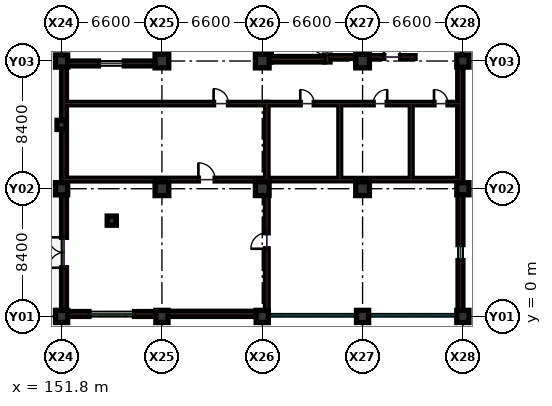
"""IFC4 building model, lengths in metres.
Left out: names, types, materials, properties, quantities, classifications, styles, units other than length and angle.
Written with IfcOpenShell. Run it as: python <this file> out.ifc"""

import sys

from ifc_helpers import new_model, si_unit, direction, frame, frame_2d, origin, origin_2d, place, context, subcontext, project, spatial, rectangle, extrude, element, fill, save


model = new_model("IFC4")
c1 = context("Model", 3, precision=1e-05, world=origin(), true_north=direction((0.0, 1.0)))
c2 = subcontext(c1, "Body", "Model", "MODEL_VIEW")
j1 = project(units=[si_unit("LENGTHUNIT", "METRE"), si_unit("PLANEANGLEUNIT", "RADIAN")], contexts=[c1])
p1 = place(None, origin())
s1 = spatial("IfcSite", under=j1, at=p1, CompositionType="ELEMENT")
p2 = place(p1, origin())
s2 = spatial("IfcBuilding", under=s1, at=p2, CompositionType="ELEMENT")
p3 = place(p2, origin())
s3 = spatial("IfcBuildingStorey", under=s2, at=p3, CompositionType="ELEMENT", Elevation=0.0)
for number, where, z_axis, x_axis in (
    (1, (151.8, 0.0, 0.0), (0.0, 0.0, 1.0), (1.0, 0.0, 0.0)),
    (2, (151.8, 8.4, 0.0), (0.0, 0.0, 1.0), (1.0, 0.0, 0.0)),
    (3, (151.8, 16.8, 0.0), (0.0, 0.0, 1.0), (1.0, 0.0, 0.0)),
    (4, (158.4, 0.0, 0.0), (0.0, 0.0, 1.0), (1.0, 0.0, 0.0)),
):
    element("IfcColumn", number, at=place(p3, frame(where, z_axis=z_axis, x_axis=x_axis)), inside=s3, PredefinedType="COLUMN", context=c2, shape_type="SweptSolid", body=[
        extrude(rectangle(XDim=0.8, YDim=0.8, at=origin_2d()), origin(), (0.0, 0.0, 1.0), 5.4),
    ])
for number, where, z_axis, x_axis in (
    (5, (158.4, 8.4, 0.0), (0.0, 0.0, 1.0), (1.0, 0.0, 0.0)),
    (6, (158.4, 16.8, 0.0), (0.0, 0.0, 1.0), (1.0, 0.0, 0.0)),
):
    element("IfcColumn", number, at=place(p3, frame(where, z_axis=z_axis, x_axis=x_axis)), inside=s3, PredefinedType="COLUMN", context=c2, shape_type="SweptSolid", body=[
        extrude(rectangle(XDim=0.9, YDim=0.9, at=origin_2d()), origin(), (0.0, 0.0, 1.0), 5.4),
    ])
p4 = place(p3, frame((165.0, 0.0, 0.0), z_axis=(0.0, 0.0, 1.0), x_axis=(1.0, 0.0, 0.0)))
e7 = element("IfcColumn", 7, at=p4, inside=s3, PredefinedType="COLUMN", context=c2, shape_type="SweptSolid", body=[
    extrude(rectangle(XDim=0.8, YDim=0.8, at=origin_2d()), origin(), (0.0, 0.0, 1.0), 5.4),
])
for number, where, z_axis, x_axis in (
    (8, (165.0, 8.4, 0.0), (0.0, 0.0, 1.0), (1.0, 0.0, 0.0)),
    (9, (165.0, 16.8, 0.0), (0.0, 0.0, 1.0), (1.0, 0.0, 0.0)),
):
    element("IfcColumn", number, at=place(p3, frame(where, z_axis=z_axis, x_axis=x_axis)), inside=s3, PredefinedType="COLUMN", context=c2, shape_type="SweptSolid", body=[
        extrude(rectangle(XDim=0.9, YDim=0.9, at=origin_2d()), origin(), (0.0, 0.0, 1.0), 5.4),
    ])
p5 = place(p3, frame((171.6, 0.0, 0.0), z_axis=(0.0, 0.0, 1.0), x_axis=(1.0, 0.0, 0.0)))
e10 = element("IfcColumn", 10, at=p5, inside=s3, PredefinedType="COLUMN", context=c2, shape_type="SweptSolid", body=[
    extrude(rectangle(XDim=0.8, YDim=0.8, at=origin_2d()), origin(), (0.0, 0.0, 1.0), 5.4),
])
for number, where, z_axis, x_axis in (
    (11, (171.6, 8.4, 0.0), (0.0, 0.0, 1.0), (1.0, 0.0, 0.0)),
    (12, (171.6, 16.8, 0.0), (0.0, 0.0, 1.0), (1.0, 0.0, 0.0)),
):
    element("IfcColumn", number, at=place(p3, frame(where, z_axis=z_axis, x_axis=x_axis)), inside=s3, PredefinedType="COLUMN", context=c2, shape_type="SweptSolid", body=[
        extrude(rectangle(XDim=0.9, YDim=0.9, at=origin_2d()), origin(), (0.0, 0.0, 1.0), 5.4),
    ])
for number, where, z_axis, x_axis in (
    (13, (178.2, 0.0, 0.0), (0.0, 0.0, 1.0), (1.0, 0.0, 0.0)),
    (14, (178.2, 8.4, 0.0), (0.0, 0.0, 1.0), (1.0, 0.0, 0.0)),
    (15, (178.2, 16.8, 0.0), (0.0, 0.0, 1.0), (1.0, 0.0, 0.0)),
):
    element("IfcColumn", number, at=place(p3, frame(where, z_axis=z_axis, x_axis=x_axis)), inside=s3, PredefinedType="COLUMN", context=c2, shape_type="SweptSolid", body=[
        extrude(rectangle(XDim=0.8, YDim=0.8, at=origin_2d()), origin(), (0.0, 0.0, 1.0), 5.4),
    ])
for number, where, z_axis, x_axis in (
    (16, (151.8, 12.6, 0.0), (0.0, 0.0, 1.0), (1.0, 0.0, 0.0)),
    (17, (155.1, 6.3, 0.0), (0.0, 0.0, 1.0), (1.0, 0.0, 0.0)),
):
    element("IfcColumn", number, at=place(p3, frame(where, z_axis=z_axis, x_axis=x_axis)), inside=s3, PredefinedType="COLUMN", context=c2, shape_type="SweptSolid", body=[
        extrude(rectangle(XDim=0.6, YDim=0.6, at=origin_2d()), origin(), (0.0, 0.0, 1.0), 5.4),
    ])
p6 = place(p3, frame((165.3, 14.0, 0.0), z_axis=(0.0, 0.0, 1.0), x_axis=(1.0, 0.0, 0.0)))
e18 = element("IfcWall", 18, at=p6, inside=s3, PredefinedType="PARTITIONING", context=c2, shape_type="SweptSolid", body=[
    extrude(rectangle(XDim=12.7, YDim=0.16, at=frame_2d((6.35, 0.0))), origin(), (0.0, 0.0, 1.0), 4.25),
])
p7 = place(p6, frame((2.2, 0.0, 0.0)))
e19 = element("IfcOpeningElement", 19, at=p7, cuts=e18, PredefinedType="OPENING", context=c2, shape_type="SweptSolid", body=[
    extrude(rectangle(XDim=0.92, YDim=2.08, at=frame_2d((0.46, 1.04))), frame((0.0, 0.09, 0.0), z_axis=(0.0, -1.0, 0.0), x_axis=(1.0, 0.0, 0.0)), (0.0, 0.0, 1.0), 0.18),
])
p8 = place(p6, frame((7.0, 0.0, 0.0)))
e20 = element("IfcOpeningElement", 20, at=p8, cuts=e18, PredefinedType="OPENING", context=c2, shape_type="SweptSolid", body=[
    extrude(rectangle(XDim=0.92, YDim=2.08, at=frame_2d((0.46, 1.04))), frame((0.0, 0.09, 0.0), z_axis=(0.0, -1.0, 0.0), x_axis=(1.0, 0.0, 0.0)), (0.0, 0.0, 1.0), 0.18),
])
p9 = place(p6, frame((11.0, 0.0, 0.0)))
e21 = element("IfcOpeningElement", 21, at=p9, cuts=e18, PredefinedType="OPENING", context=c2, shape_type="SweptSolid", body=[
    extrude(rectangle(XDim=0.92, YDim=2.08, at=frame_2d((0.46, 1.04))), frame((0.0, 0.09, 0.0), z_axis=(0.0, -1.0, 0.0), x_axis=(1.0, 0.0, 0.0)), (0.0, 0.0, 1.0), 0.18),
])
p10 = place(p3, frame((165.3, 9.0, 0.0), z_axis=(0.0, 0.0, 1.0), x_axis=(1.0, 0.0, 0.0)))
e22 = element("IfcWall", 22, at=p10, inside=s3, PredefinedType="PARTITIONING", context=c2, shape_type="SweptSolid", body=[
    extrude(rectangle(XDim=12.7, YDim=0.16, at=frame_2d((6.35, 0.0))), origin(), (0.0, 0.0, 1.0), 4.25),
])
p11 = place(p3, frame((165.3, 9.0, 0.0), z_axis=(0.0, 0.0, 1.0), x_axis=(0.0, 1.0, 0.0)))
e23 = element("IfcWall", 23, at=p11, inside=s3, PredefinedType="PARTITIONING", context=c2, shape_type="SweptSolid", body=[
    extrude(rectangle(XDim=5.0, YDim=0.16, at=frame_2d((2.5, 0.0))), origin(), (0.0, 0.0, 1.0), 4.25),
])
for number, where, z_axis, x_axis in (
    (24, (170.1, 9.0, 0.0), (0.0, 0.0, 1.0), (0.0, 1.0, 0.0)),
    (25, (174.8, 9.0, 0.0), (0.0, 0.0, 1.0), (0.0, 1.0, 0.0)),
):
    element("IfcWall", number, at=place(p3, frame(where, z_axis=z_axis, x_axis=x_axis)), inside=s3, PredefinedType="PARTITIONING", context=c2, shape_type="SweptSolid", body=[
        extrude(rectangle(XDim=5.0, YDim=0.12, at=frame_2d((2.5, 0.0))), origin(), (0.0, 0.0, 1.0), 4.25),
    ])
p12 = place(p3, frame((152.0, 9.0, 0.0), z_axis=(0.0, 0.0, 1.0), x_axis=(1.0, 0.0, 0.0)))
e26 = element("IfcWall", 26, at=p12, inside=s3, PredefinedType="SOLIDWALL", context=c2, shape_type="SweptSolid", body=[
    extrude(rectangle(XDim=13.3, YDim=0.18, at=frame_2d((6.65, 0.0))), origin(), (0.0, 0.0, 1.0), 4.25),
])
p13 = place(p12, frame((8.8, 0.0, 0.0)))
e27 = element("IfcOpeningElement", 27, at=p13, cuts=e26, PredefinedType="OPENING", context=c2, shape_type="SweptSolid", body=[
    extrude(rectangle(XDim=1.1, YDim=2.15, at=frame_2d((0.55, 1.075))), frame((0.0, 0.1, 0.0), z_axis=(0.0, -1.0, 0.0), x_axis=(1.0, 0.0, 0.0)), (0.0, 0.0, 1.0), 0.2),
])
p14 = place(p3, frame((165.3, 0.25, 0.0), z_axis=(0.0, 0.0, 1.0), x_axis=(0.0, 1.0, 0.0)))
e28 = element("IfcWall", 28, at=p14, inside=s3, PredefinedType="SOLIDWALL", context=c2, shape_type="SweptSolid", body=[
    extrude(rectangle(XDim=7.7, YDim=0.18, at=frame_2d((3.85, 0.0))), origin(), (0.0, 0.0, 1.0), 4.25),
])
p15 = place(p14, frame((4.2, 0.0, 0.0)))
e29 = element("IfcOpeningElement", 29, at=p15, cuts=e28, PredefinedType="OPENING", context=c2, shape_type="SweptSolid", body=[
    extrude(rectangle(XDim=1.05, YDim=2.15, at=frame_2d((0.525, 1.075))), frame((0.0, 0.1, 0.0), z_axis=(0.0, -1.0, 0.0), x_axis=(1.0, 0.0, 0.0)), (0.0, 0.0, 1.0), 0.2),
])
p16 = place(p3, frame((152.0, 14.0, 0.0), z_axis=(0.0, 0.0, 1.0), x_axis=(1.0, 0.0, 0.0)))
e30 = element("IfcWall", 30, at=p16, inside=s3, PredefinedType="PARTITIONING", context=c2, shape_type="SweptSolid", body=[
    extrude(rectangle(XDim=13.3, YDim=0.16, at=frame_2d((6.65, 0.0))), origin(), (0.0, 0.0, 1.0), 4.25),
])
p17 = place(p16, frame((9.8, 0.0, 0.0)))
e31 = element("IfcOpeningElement", 31, at=p17, cuts=e30, PredefinedType="OPENING", context=c2, shape_type="SweptSolid", body=[
    extrude(rectangle(XDim=0.98, YDim=2.12, at=frame_2d((0.49, 1.06))), frame((0.0, 0.09, 0.0), z_axis=(0.0, -1.0, 0.0), x_axis=(1.0, 0.0, 0.0)), (0.0, 0.0, 1.0), 0.18),
])
p18 = place(p3, frame((152.195, 0.16, 0.0), z_axis=(0.0, 0.0, 1.0), x_axis=(1.0, 0.0, 0.0)))
e32 = element("IfcWall", 32, at=p18, inside=s3, PredefinedType="SOLIDWALL", context=c2, shape_type="SweptSolid", body=[
    extrude(rectangle(XDim=5.81, YDim=0.32, at=frame_2d((2.905, 0.0))), origin(), (0.0, 0.0, 1.0), 4.385),
])
p19 = place(p18, frame((1.405, 0.0, 0.95)))
e33 = element("IfcOpeningElement", 33, at=p19, cuts=e32, PredefinedType="OPENING", context=c2, shape_type="SweptSolid", body=[
    extrude(rectangle(XDim=3.0, YDim=1.8, at=frame_2d((1.5, 0.9))), frame((0.0, 0.17, 0.0), z_axis=(0.0, -1.0, 0.0), x_axis=(1.0, 0.0, 0.0)), (0.0, 0.0, 1.0), 0.34),
])
p20 = place(p3, frame((151.96, 8.005, 0.0), z_axis=(0.0, 0.0, 1.0), x_axis=(0.0, -1.0, 0.0)))
e34 = element("IfcWall", 34, at=p20, inside=s3, PredefinedType="SOLIDWALL", context=c2, shape_type="SweptSolid", body=[
    extrude(rectangle(XDim=7.61, YDim=0.32, at=frame_2d((3.805, 0.0))), origin(), (0.0, 0.0, 1.0), 4.335),
])
p21 = place(p20, frame((2.805, 0.0, 0.0)))
e35 = element("IfcOpeningElement", 35, at=p21, cuts=e34, PredefinedType="OPENING", context=c2, shape_type="SweptSolid", body=[
    extrude(rectangle(XDim=2.0, YDim=2.4, at=frame_2d((1.0, 1.2))), frame((0.0, 0.17, 0.0), z_axis=(0.0, -1.0, 0.0), x_axis=(1.0, 0.0, 0.0)), (0.0, 0.0, 1.0), 0.34),
])
p22 = place(p3, frame((157.955, 16.64, 0.0), z_axis=(0.0, 0.0, 1.0), x_axis=(-1.0, 0.0, 0.0)))
e36 = element("IfcWall", 36, at=p22, inside=s3, PredefinedType="SOLIDWALL", context=c2, shape_type="SweptSolid", body=[
    extrude(rectangle(XDim=5.76, YDim=0.32, at=frame_2d((2.88, 0.0))), origin(), (0.0, 0.0, 1.0), 4.385),
])
p23 = place(p22, frame((2.03, 0.0, 0.95)))
e37 = element("IfcOpeningElement", 37, at=p23, cuts=e36, PredefinedType="OPENING", context=c2, shape_type="SweptSolid", body=[
    extrude(rectangle(XDim=1.7, YDim=1.95, at=frame_2d((0.85, 0.975))), frame((0.0, 0.17, 0.0), z_axis=(0.0, -1.0, 0.0), x_axis=(1.0, 0.0, 0.0)), (0.0, 0.0, 1.0), 0.34),
])
p24 = place(p3, frame((151.96, 16.405, 0.0), z_axis=(0.0, 0.0, 1.0), x_axis=(0.0, -1.0, 0.0)))
e38 = element("IfcWall", 38, at=p24, inside=s3, PredefinedType="SOLIDWALL", context=c2, shape_type="SweptSolid", body=[
    extrude(rectangle(XDim=7.61, YDim=0.32, at=frame_2d((3.805, 0.0))), origin(), (0.0, 0.0, 1.0), 4.335),
])
p25 = place(p3, frame((158.795, 0.17, 0.0), z_axis=(0.0, 0.0, 1.0), x_axis=(1.0, 0.0, 0.0)))
e39 = element("IfcWall", 39, at=p25, inside=s3, PredefinedType="SHEAR", context=c2, shape_type="SweptSolid", body=[
    extrude(rectangle(XDim=5.81, YDim=0.34, at=frame_2d((2.905, 0.0))), origin(), (0.0, 0.0, 1.0), 5.1),
])
p26 = place(p3, frame((158.56, 24.755, 0.0), z_axis=(0.0, 0.0, 1.0), x_axis=(0.0, -1.0, 0.0)))
e40 = element("IfcWall", 40, at=p26, inside=s3, PredefinedType="SOLIDWALL", context=c2, shape_type="SweptSolid", body=[
    extrude(rectangle(XDim=7.51, YDim=0.32, at=frame_2d((3.755, 0.0))), origin(), (0.0, 0.0, 1.0), 4.335),
])
p27 = place(p26, frame((2.955, 0.0, 0.95)))
e41 = element("IfcOpeningElement", 41, at=p27, cuts=e40, PredefinedType="OPENING", context=c2, shape_type="SweptSolid", body=[
    extrude(rectangle(XDim=1.6, YDim=1.85, at=frame_2d((0.8, 0.925))), frame((0.0, 0.17, 0.0), z_axis=(0.0, -1.0, 0.0), x_axis=(1.0, 0.0, 0.0)), (0.0, 0.0, 1.0), 0.34),
])
p28 = place(p3, frame((178.04, 0.395, 0.0), z_axis=(0.0, 0.0, 1.0), x_axis=(0.0, 1.0, 0.0)))
e42 = element("IfcWall", 42, at=p28, inside=s3, PredefinedType="SOLIDWALL", context=c2, shape_type="SweptSolid", body=[
    extrude(rectangle(XDim=7.61, YDim=0.32, at=frame_2d((3.805, 0.0))), origin(), (0.0, 0.0, 1.0), 4.335),
])
p29 = place(p28, frame((3.28, 0.0, 0.95)))
e43 = element("IfcOpeningElement", 43, at=p29, cuts=e42, PredefinedType="OPENING", context=c2, shape_type="SweptSolid", body=[
    extrude(rectangle(XDim=1.05, YDim=1.75, at=frame_2d((0.525, 0.875))), frame((0.0, 0.17, 0.0), z_axis=(0.0, -1.0, 0.0), x_axis=(1.0, 0.0, 0.0)), (0.0, 0.0, 1.0), 0.34),
])
p30 = place(p3, frame((178.03, 8.795, 0.0), z_axis=(0.0, 0.0, 1.0), x_axis=(0.0, 1.0, 0.0)))
e44 = element("IfcWall", 44, at=p30, inside=s3, PredefinedType="SHEAR", context=c2, shape_type="SweptSolid", body=[
    extrude(rectangle(XDim=7.61, YDim=0.34, at=frame_2d((3.805, 0.0))), origin(), (0.0, 0.0, 1.0), 5.1),
])
p31 = place(p3, frame((165.42, 16.74, 0.0), z_axis=(0.0, 0.0, 1.0), x_axis=(0.0, 1.0, 0.0)))
e45 = element("IfcWall", 45, at=p31, inside=s3, PredefinedType="SHEAR", context=c2, shape_type="SweptSolid", body=[
    extrude(rectangle(XDim=8.37, YDim=0.36, at=frame_2d((4.185, 0.0))), origin(), (0.0, 0.0, 1.0), 5.1),
])
p32 = place(p3, frame((169.28, 16.74, 0.0), z_axis=(0.0, 0.0, 1.0), x_axis=(0.0, 1.0, 0.0)))
e46 = element("IfcWall", 46, at=p32, inside=s3, PredefinedType="SHEAR", context=c2, shape_type="SweptSolid", body=[
    extrude(rectangle(XDim=8.37, YDim=0.36, at=frame_2d((4.185, 0.0))), origin(), (0.0, 0.0, 1.0), 5.1),
])
p33 = place(p32, frame((0.45, 0.0, 0.0)))
e47 = element("IfcOpeningElement", 47, at=p33, cuts=e46, PredefinedType="OPENING", context=c2, shape_type="SweptSolid", body=[
    extrude(rectangle(XDim=1.25, YDim=2.15, at=frame_2d((0.625, 1.075))), frame((0.0, 0.19, 0.0), z_axis=(0.0, -1.0, 0.0), x_axis=(1.0, 0.0, 0.0)), (0.0, 0.0, 1.0), 0.38),
])
p34 = place(p3, frame((165.6, 16.92, 0.0), z_axis=(0.0, 0.0, 1.0), x_axis=(1.0, 0.0, 0.0)))
e48 = element("IfcWall", 48, at=p34, inside=s3, PredefinedType="SHEAR", context=c2, shape_type="SweptSolid", body=[
    extrude(rectangle(XDim=3.5, YDim=0.36, at=frame_2d((1.75, 0.0))), origin(), (0.0, 0.0, 1.0), 5.1),
])
p35 = place(p3, frame((169.35, 17.06, 0.0), z_axis=(0.0, 0.0, 1.0), x_axis=(1.0, 0.0, 0.0)))
e49 = element("IfcWall", 49, at=p35, inside=s3, PredefinedType="SOLIDWALL", context=c2, shape_type="SweptSolid", body=[
    extrude(rectangle(XDim=5.7, YDim=0.18, at=frame_2d((2.85, 0.0))), origin(), (0.0, 0.0, 1.0), 4.235),
])
p36 = place(p35, frame((3.65, 0.0, 0.0)))
e50 = element("IfcOpeningElement", 50, at=p36, cuts=e49, PredefinedType="OPENING", context=c2, shape_type="SweptSolid", body=[
    extrude(rectangle(XDim=1.1, YDim=2.15, at=frame_2d((0.55, 1.075))), frame((0.0, 0.1, 0.0), z_axis=(0.0, -1.0, 0.0), x_axis=(1.0, 0.0, 0.0)), (0.0, 0.0, 1.0), 0.2),
])
p37 = place(p7, origin())
e51 = element("IfcDoor", 51, at=p37, inside=s3, OperationType="SINGLE_SWING_LEFT", PredefinedType="DOOR", context=c2, shape_type="SweptSolid", body=[
    extrude(rectangle(XDim=0.92, YDim=2.08, at=frame_2d((0.46, 1.04))), frame((0.0, 0.025, 0.0), z_axis=(0.0, -1.0, 0.0), x_axis=(1.0, 0.0, 0.0)), (0.0, 0.0, 1.0), 0.05),
])
fill(e19, e51)
p38 = place(p8, origin())
e52 = element("IfcDoor", 52, at=p38, inside=s3, OperationType="SINGLE_SWING_RIGHT", PredefinedType="DOOR", context=c2, shape_type="SweptSolid", body=[
    extrude(rectangle(XDim=0.92, YDim=2.08, at=frame_2d((0.46, 1.04))), frame((0.0, 0.025, 0.0), z_axis=(0.0, -1.0, 0.0), x_axis=(1.0, 0.0, 0.0)), (0.0, 0.0, 1.0), 0.05),
])
fill(e20, e52)
p39 = place(p9, origin())
e53 = element("IfcDoor", 53, at=p39, inside=s3, OperationType="SINGLE_SWING_LEFT", PredefinedType="DOOR", context=c2, shape_type="SweptSolid", body=[
    extrude(rectangle(XDim=0.92, YDim=2.08, at=frame_2d((0.46, 1.04))), frame((0.0, 0.025, 0.0), z_axis=(0.0, -1.0, 0.0), x_axis=(1.0, 0.0, 0.0)), (0.0, 0.0, 1.0), 0.05),
])
fill(e21, e53)
p40 = place(p13, origin())
e54 = element("IfcDoor", 54, at=p40, inside=s3, OperationType="SINGLE_SWING_LEFT", PredefinedType="DOOR", context=c2, shape_type="SweptSolid", body=[
    extrude(rectangle(XDim=1.1, YDim=2.15, at=frame_2d((0.55, 1.075))), frame((0.0, 0.025, 0.0), z_axis=(0.0, -1.0, 0.0), x_axis=(1.0, 0.0, 0.0)), (0.0, 0.0, 1.0), 0.05),
])
fill(e27, e54)
p41 = place(p15, origin())
e55 = element("IfcDoor", 55, at=p41, inside=s3, OperationType="SINGLE_SWING_LEFT", PredefinedType="DOOR", context=c2, shape_type="SweptSolid", body=[
    extrude(rectangle(XDim=1.05, YDim=2.15, at=frame_2d((0.525, 1.075))), frame((0.0, 0.025, 0.0), z_axis=(0.0, -1.0, 0.0), x_axis=(1.0, 0.0, 0.0)), (0.0, 0.0, 1.0), 0.05),
])
fill(e29, e55)
p42 = place(p17, origin())
e56 = element("IfcDoor", 56, at=p42, inside=s3, OperationType="SINGLE_SWING_LEFT", PredefinedType="DOOR", context=c2, shape_type="SweptSolid", body=[
    extrude(rectangle(XDim=0.98, YDim=2.12, at=frame_2d((0.49, 1.06))), frame((0.0, 0.025, 0.0), z_axis=(0.0, -1.0, 0.0), x_axis=(1.0, 0.0, 0.0)), (0.0, 0.0, 1.0), 0.05),
])
fill(e31, e56)
p43 = place(p19, origin())
e57 = element("IfcWindow", 57, at=p43, inside=s3, PartitioningType="SINGLE_PANEL", PredefinedType="WINDOW", context=c2, shape_type="SweptSolid", body=[
    extrude(rectangle(XDim=3.0, YDim=1.8, at=frame_2d((1.5, 0.9))), frame((0.0, 0.03, 0.0), z_axis=(0.0, -1.0, 0.0), x_axis=(1.0, 0.0, 0.0)), (0.0, 0.0, 1.0), 0.06),
])
fill(e33, e57)
p44 = place(p21, frame((2.0, 0.0, 0.0), z_axis=(0.0, 0.0, 1.0), x_axis=(-1.0, 0.0, 0.0)))
e58 = element("IfcDoor", 58, at=p44, inside=s3, OperationType="DOUBLE_DOOR_SINGLE_SWING", PredefinedType="DOOR", context=c2, shape_type="SweptSolid", body=[
    extrude(rectangle(XDim=2.0, YDim=2.4, at=frame_2d((1.0, 1.2))), frame((0.0, 0.025, 0.0), z_axis=(0.0, -1.0, 0.0), x_axis=(1.0, 0.0, 0.0)), (0.0, 0.0, 1.0), 0.05),
])
fill(e35, e58)
p45 = place(p23, origin())
e59 = element("IfcWindow", 59, at=p45, inside=s3, PartitioningType="SINGLE_PANEL", PredefinedType="WINDOW", context=c2, shape_type="SweptSolid", body=[
    extrude(rectangle(XDim=1.7, YDim=1.95, at=frame_2d((0.85, 0.975))), frame((0.0, 0.03, 0.0), z_axis=(0.0, -1.0, 0.0), x_axis=(1.0, 0.0, 0.0)), (0.0, 0.0, 1.0), 0.06),
])
fill(e37, e59)
p46 = place(p29, origin())
e60 = element("IfcWindow", 60, at=p46, inside=s3, PartitioningType="SINGLE_PANEL", PredefinedType="WINDOW", context=c2, shape_type="SweptSolid", body=[
    extrude(rectangle(XDim=1.05, YDim=1.75, at=frame_2d((0.525, 0.875))), frame((0.0, 0.03, 0.0), z_axis=(0.0, -1.0, 0.0), x_axis=(1.0, 0.0, 0.0)), (0.0, 0.0, 1.0), 0.06),
])
fill(e43, e60)
p47 = place(p33, origin())
e61 = element("IfcDoor", 61, at=p47, inside=s3, OperationType="SINGLE_SWING_RIGHT", PredefinedType="DOOR", context=c2, shape_type="SweptSolid", body=[
    extrude(rectangle(XDim=1.25, YDim=2.15, at=frame_2d((0.625, 1.075))), frame((0.0, 0.025, 0.0), z_axis=(0.0, -1.0, 0.0), x_axis=(1.0, 0.0, 0.0)), (0.0, 0.0, 1.0), 0.05),
])
fill(e47, e61)
p48 = place(p36, origin())
e62 = element("IfcDoor", 62, at=p48, inside=s3, OperationType="SINGLE_SWING_LEFT", PredefinedType="DOOR", context=c2, shape_type="SweptSolid", body=[
    extrude(rectangle(XDim=1.1, YDim=2.15, at=frame_2d((0.55, 1.075))), frame((0.0, 0.025, 0.0), z_axis=(0.0, -1.0, 0.0), x_axis=(1.0, 0.0, 0.0)), (0.0, 0.0, 1.0), 0.05),
])
fill(e50, e62)
save(model, sys.argv[1])
